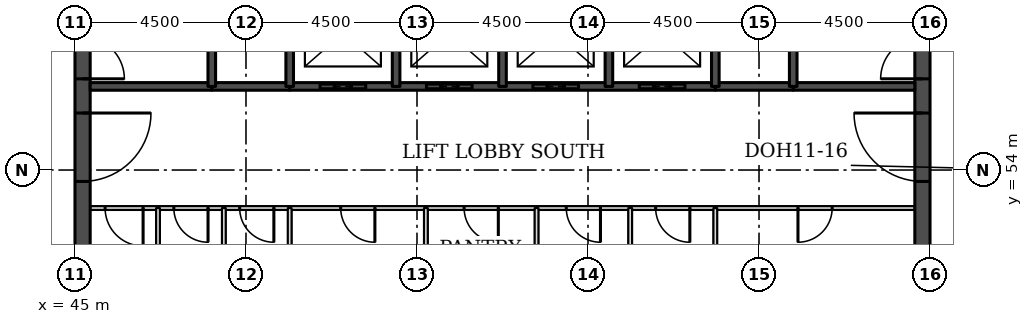
"""IFC4 building model, lengths in metres.
Left out: names, types, materials, properties, quantities, classifications, styles, units other than length and angle.
Written with IfcOpenShell. Run it as: python <this file> out.ifc"""

import sys

from ifc_helpers import new_model, si_unit, direction, frame, frame_2d, origin, place, context, subcontext, project, spatial, rectangle, extrude, element, fill, save


model = new_model("IFC4")
c1 = context("Model", 3, precision=1e-05, world=origin(), true_north=direction((0.0, 1.0)))
c2 = subcontext(c1, "Body", "Model", "MODEL_VIEW")
j1 = project(units=[si_unit("LENGTHUNIT", "METRE"), si_unit("PLANEANGLEUNIT", "RADIAN")], contexts=[c1])
p1 = place(None, origin())
s1 = spatial("IfcSite", under=j1, at=p1, CompositionType="ELEMENT")
p2 = place(p1, origin())
s2 = spatial("IfcBuilding", under=s1, at=p2, CompositionType="ELEMENT")
p3 = place(p2, frame((0.0, 0.0, 234.1)))
s3 = spatial("IfcBuildingStorey", under=s2, at=p3, CompositionType="ELEMENT", Elevation=234.1)
p4 = place(p3, frame((45.2, 49.5, 0.0), z_axis=(0.0, 0.0, 1.0), x_axis=(0.0, 1.0, 0.0)))
e1 = element("IfcWall", 1, at=p4, inside=s3, PredefinedType="SHEAR", context=c2, shape_type="SweptSolid", body=[
    extrude(rectangle(XDim=22.5, YDim=0.4, at=frame_2d((11.25, 0.0))), origin(), (0.0, 0.0, 1.0), 3.7),
])
p5 = place(p4, frame((4.2, 0.0, 0.0)))
e2 = element("IfcOpeningElement", 2, at=p5, cuts=e1, PredefinedType="OPENING", context=c2, shape_type="SweptSolid", body=[
    extrude(rectangle(XDim=1.8, YDim=2.1, at=frame_2d((0.9, 1.05))), frame((0.0, 0.21, 0.0), z_axis=(0.0, -1.0, 0.0), x_axis=(1.0, 0.0, 0.0)), (0.0, 0.0, 1.0), 0.42),
])
p6 = place(p4, frame((6.9, 0.0, 0.0)))
e3 = element("IfcOpeningElement", 3, at=p6, cuts=e1, PredefinedType="OPENING", context=c2, shape_type="SweptSolid", body=[
    extrude(rectangle(XDim=1.1, YDim=2.1, at=frame_2d((0.55, 1.05))), frame((0.0, 0.21, 0.0), z_axis=(0.0, -1.0, 0.0), x_axis=(1.0, 0.0, 0.0)), (0.0, 0.0, 1.0), 0.42),
])
p7 = place(p4, frame((13.6, 0.0, 0.0)))
e4 = element("IfcOpeningElement", 4, at=p7, cuts=e1, PredefinedType="OPENING", context=c2, shape_type="SweptSolid", body=[
    extrude(rectangle(XDim=1.1, YDim=2.1, at=frame_2d((0.55, 1.05))), frame((0.0, 0.21, 0.0), z_axis=(0.0, -1.0, 0.0), x_axis=(1.0, 0.0, 0.0)), (0.0, 0.0, 1.0), 0.42),
])
p8 = place(p4, frame((16.5, 0.0, 0.0)))
e5 = element("IfcOpeningElement", 5, at=p8, cuts=e1, PredefinedType="OPENING", context=c2, shape_type="SweptSolid", body=[
    extrude(rectangle(XDim=1.8, YDim=2.1, at=frame_2d((0.9, 1.05))), frame((0.0, 0.21, 0.0), z_axis=(0.0, -1.0, 0.0), x_axis=(1.0, 0.0, 0.0)), (0.0, 0.0, 1.0), 0.42),
])
p9 = place(p3, frame((67.3, 49.5, 0.0), z_axis=(0.0, 0.0, 1.0), x_axis=(0.0, 1.0, 0.0)))
e6 = element("IfcWall", 6, at=p9, inside=s3, PredefinedType="SHEAR", context=c2, shape_type="SweptSolid", body=[
    extrude(rectangle(XDim=22.5, YDim=0.4, at=frame_2d((11.25, 0.0))), origin(), (0.0, 0.0, 1.0), 3.7),
])
p10 = place(p9, frame((4.2, 0.0, 0.0)))
e7 = element("IfcOpeningElement", 7, at=p10, cuts=e6, PredefinedType="OPENING", context=c2, shape_type="SweptSolid", body=[
    extrude(rectangle(XDim=1.8, YDim=2.1, at=frame_2d((0.9, 1.05))), frame((0.0, 0.21, 0.0), z_axis=(0.0, -1.0, 0.0), x_axis=(1.0, 0.0, 0.0)), (0.0, 0.0, 1.0), 0.42),
])
p11 = place(p9, frame((6.9, 0.0, 0.0)))
e8 = element("IfcOpeningElement", 8, at=p11, cuts=e6, PredefinedType="OPENING", context=c2, shape_type="SweptSolid", body=[
    extrude(rectangle(XDim=1.1, YDim=2.1, at=frame_2d((0.55, 1.05))), frame((0.0, 0.21, 0.0), z_axis=(0.0, -1.0, 0.0), x_axis=(1.0, 0.0, 0.0)), (0.0, 0.0, 1.0), 0.42),
])
p12 = place(p9, frame((13.6, 0.0, 0.0)))
e9 = element("IfcOpeningElement", 9, at=p12, cuts=e6, PredefinedType="OPENING", context=c2, shape_type="SweptSolid", body=[
    extrude(rectangle(XDim=1.1, YDim=2.1, at=frame_2d((0.55, 1.05))), frame((0.0, 0.21, 0.0), z_axis=(0.0, -1.0, 0.0), x_axis=(1.0, 0.0, 0.0)), (0.0, 0.0, 1.0), 0.42),
])
p13 = place(p9, frame((16.5, 0.0, 0.0)))
e10 = element("IfcOpeningElement", 10, at=p13, cuts=e6, PredefinedType="OPENING", context=c2, shape_type="SweptSolid", body=[
    extrude(rectangle(XDim=1.8, YDim=2.1, at=frame_2d((0.9, 1.05))), frame((0.0, 0.21, 0.0), z_axis=(0.0, -1.0, 0.0), x_axis=(1.0, 0.0, 0.0)), (0.0, 0.0, 1.0), 0.42),
])
p14 = place(p3, frame((45.4, 53.0, 0.0), z_axis=(0.0, 0.0, 1.0), x_axis=(1.0, 0.0, 0.0)))
e11 = element("IfcWall", 11, at=p14, inside=s3, PredefinedType="PARTITIONING", context=c2, shape_type="SweptSolid", body=[
    extrude(rectangle(XDim=21.7, YDim=0.1, at=frame_2d((10.85, 0.0))), origin(), (0.0, 0.0, 1.0), 3.55),
])
p15 = place(p14, frame((18.625, 0.0, 0.0)))
e12 = element("IfcOpeningElement", 12, at=p15, cuts=e11, PredefinedType="OPENING", context=c2, shape_type="SweptSolid", body=[
    extrude(rectangle(XDim=0.9, YDim=2.1, at=frame_2d((0.45, 1.05))), frame((0.0, 0.06, 0.0), z_axis=(0.0, -1.0, 0.0), x_axis=(1.0, 0.0, 0.0)), (0.0, 0.0, 1.0), 0.12),
])
p16 = place(p14, frame((0.393, 0.0, 0.0)))
e13 = element("IfcOpeningElement", 13, at=p16, cuts=e11, PredefinedType="OPENING", context=c2, shape_type="SweptSolid", body=[
    extrude(rectangle(XDim=1.0, YDim=2.1, at=frame_2d((0.5, 1.05))), frame((0.0, 0.06, 0.0), z_axis=(0.0, -1.0, 0.0), x_axis=(1.0, 0.0, 0.0)), (0.0, 0.0, 1.0), 0.12),
])
p17 = place(p14, frame((2.201, 0.0, 0.0)))
e14 = element("IfcOpeningElement", 14, at=p17, cuts=e11, PredefinedType="OPENING", context=c2, shape_type="SweptSolid", body=[
    extrude(rectangle(XDim=0.9, YDim=2.1, at=frame_2d((0.45, 1.05))), frame((0.0, 0.06, 0.0), z_axis=(0.0, -1.0, 0.0), x_axis=(1.0, 0.0, 0.0)), (0.0, 0.0, 1.0), 0.12),
])
p18 = place(p14, frame((3.934, 0.0, 0.0)))
e15 = element("IfcOpeningElement", 15, at=p18, cuts=e11, PredefinedType="OPENING", context=c2, shape_type="SweptSolid", body=[
    extrude(rectangle(XDim=0.9, YDim=2.1, at=frame_2d((0.45, 1.05))), frame((0.0, 0.06, 0.0), z_axis=(0.0, -1.0, 0.0), x_axis=(1.0, 0.0, 0.0)), (0.0, 0.0, 1.0), 0.12),
])
p19 = place(p14, frame((6.592, 0.0, 0.0)))
e16 = element("IfcOpeningElement", 16, at=p19, cuts=e11, PredefinedType="OPENING", context=c2, shape_type="SweptSolid", body=[
    extrude(rectangle(XDim=0.9, YDim=2.1, at=frame_2d((0.45, 1.05))), frame((0.0, 0.06, 0.0), z_axis=(0.0, -1.0, 0.0), x_axis=(1.0, 0.0, 0.0)), (0.0, 0.0, 1.0), 0.12),
])
p20 = place(p14, frame((9.84, 0.0, 0.0)))
e17 = element("IfcOpeningElement", 17, at=p20, cuts=e11, PredefinedType="OPENING", context=c2, shape_type="SweptSolid", body=[
    extrude(rectangle(XDim=0.9, YDim=2.1, at=frame_2d((0.45, 1.05))), frame((0.0, 0.06, 0.0), z_axis=(0.0, -1.0, 0.0), x_axis=(1.0, 0.0, 0.0)), (0.0, 0.0, 1.0), 0.12),
])
p21 = place(p14, frame((12.528, 0.0, 0.0)))
e18 = element("IfcOpeningElement", 18, at=p21, cuts=e11, PredefinedType="OPENING", context=c2, shape_type="SweptSolid", body=[
    extrude(rectangle(XDim=0.9, YDim=2.1, at=frame_2d((0.45, 1.05))), frame((0.0, 0.06, 0.0), z_axis=(0.0, -1.0, 0.0), x_axis=(1.0, 0.0, 0.0)), (0.0, 0.0, 1.0), 0.12),
])
p22 = place(p14, frame((14.88, 0.0, 0.0)))
e19 = element("IfcOpeningElement", 19, at=p22, cuts=e11, PredefinedType="OPENING", context=c2, shape_type="SweptSolid", body=[
    extrude(rectangle(XDim=0.9, YDim=2.1, at=frame_2d((0.45, 1.05))), frame((0.0, 0.06, 0.0), z_axis=(0.0, -1.0, 0.0), x_axis=(1.0, 0.0, 0.0)), (0.0, 0.0, 1.0), 0.12),
])
for number, where, z_axis, x_axis in (
    (20, (48.6, 56.2, 0.0), (0.0, 0.0, 1.0), (1.0, 0.0, 0.0)),
    (21, (61.85, 56.2, 0.0), (0.0, 0.0, 1.0), (1.0, 0.0, 0.0)),
):
    element("IfcWall", number, at=place(p3, frame(where, z_axis=z_axis, x_axis=x_axis)), inside=s3, PredefinedType="SOLIDWALL", context=c2, shape_type="SweptSolid", body=[
        extrude(rectangle(XDim=2.05, YDim=0.2, at=frame_2d((1.025, 0.0))), origin(), (0.0, 0.0, 1.0), 3.55),
    ])
p23 = place(p3, frame((45.4, 56.2, 0.0), z_axis=(0.0, 0.0, 1.0), x_axis=(1.0, 0.0, 0.0)))
e22 = element("IfcWall", 22, at=p23, inside=s3, PredefinedType="SOLIDWALL", context=c2, shape_type="SweptSolid", body=[
    extrude(rectangle(XDim=3.2, YDim=0.2, at=frame_2d((1.6, 0.0))), origin(), (0.0, 0.0, 1.0), 3.55),
])
p24 = place(p3, frame((50.65, 56.2, 0.0), z_axis=(0.0, 0.0, 1.0), x_axis=(1.0, 0.0, 0.0)))
e23 = element("IfcWall", 23, at=p24, inside=s3, PredefinedType="SOLIDWALL", context=c2, shape_type="SweptSolid", body=[
    extrude(rectangle(XDim=11.2, YDim=0.2, at=frame_2d((5.6, 0.0))), origin(), (0.0, 0.0, 1.0), 3.55),
])
p25 = place(p24, frame((0.8, 0.0, 0.0)))
e24 = element("IfcOpeningElement", 24, at=p25, cuts=e23, PredefinedType="OPENING", context=c2, shape_type="SweptSolid", body=[
    extrude(rectangle(XDim=1.2, YDim=2.1, at=frame_2d((0.6, 1.05))), frame((0.0, 0.11, 0.0), z_axis=(0.0, -1.0, 0.0), x_axis=(1.0, 0.0, 0.0)), (0.0, 0.0, 1.0), 0.22),
])
p26 = place(p24, frame((3.6, 0.0, 0.0)))
e25 = element("IfcOpeningElement", 25, at=p26, cuts=e23, PredefinedType="OPENING", context=c2, shape_type="SweptSolid", body=[
    extrude(rectangle(XDim=1.2, YDim=2.1, at=frame_2d((0.6, 1.05))), frame((0.0, 0.11, 0.0), z_axis=(0.0, -1.0, 0.0), x_axis=(1.0, 0.0, 0.0)), (0.0, 0.0, 1.0), 0.22),
])
p27 = place(p24, frame((6.4, 0.0, 0.0)))
e26 = element("IfcOpeningElement", 26, at=p27, cuts=e23, PredefinedType="OPENING", context=c2, shape_type="SweptSolid", body=[
    extrude(rectangle(XDim=1.2, YDim=2.1, at=frame_2d((0.6, 1.05))), frame((0.0, 0.11, 0.0), z_axis=(0.0, -1.0, 0.0), x_axis=(1.0, 0.0, 0.0)), (0.0, 0.0, 1.0), 0.22),
])
p28 = place(p24, frame((9.2, 0.0, 0.0)))
e27 = element("IfcOpeningElement", 27, at=p28, cuts=e23, PredefinedType="OPENING", context=c2, shape_type="SweptSolid", body=[
    extrude(rectangle(XDim=1.2, YDim=2.1, at=frame_2d((0.6, 1.05))), frame((0.0, 0.11, 0.0), z_axis=(0.0, -1.0, 0.0), x_axis=(1.0, 0.0, 0.0)), (0.0, 0.0, 1.0), 0.22),
])
p29 = place(p3, frame((63.9, 56.2, 0.0), z_axis=(0.0, 0.0, 1.0), x_axis=(1.0, 0.0, 0.0)))
e28 = element("IfcWall", 28, at=p29, inside=s3, PredefinedType="SOLIDWALL", context=c2, shape_type="SweptSolid", body=[
    extrude(rectangle(XDim=3.2, YDim=0.2, at=frame_2d((1.6, 0.0))), origin(), (0.0, 0.0, 1.0), 3.55),
])
p30 = place(p3, frame((47.185, 49.9, 0.0), z_axis=(0.0, 0.0, 1.0), x_axis=(0.0, 1.0, 0.0)))
e29 = element("IfcWall", 29, at=p30, inside=s3, PredefinedType="PARTITIONING", context=c2, shape_type="SweptSolid", body=[
    extrude(rectangle(XDim=3.1, YDim=0.1, at=frame_2d((1.55, 0.0))), origin(), (0.0, 0.0, 1.0), 3.55),
])
p31 = place(p3, frame((48.6, 56.2, 0.0), z_axis=(0.0, 0.0, 1.0), x_axis=(0.0, 1.0, 0.0)))
e30 = element("IfcWall", 30, at=p31, inside=s3, PredefinedType="SOLIDWALL", context=c2, shape_type="SweptSolid", body=[
    extrude(rectangle(XDim=5.8, YDim=0.2, at=frame_2d((2.9, 0.0))), origin(), (0.0, 0.0, 1.0), 3.55),
])
for number, where, z_axis, x_axis in (
    (31, (48.917, 49.9, 0.0), (0.0, 0.0, 1.0), (0.0, 1.0, 0.0)),
    (32, (50.65, 49.9, 0.0), (0.0, 0.0, 1.0), (0.0, 1.0, 0.0)),
):
    element("IfcWall", number, at=place(p3, frame(where, z_axis=z_axis, x_axis=x_axis)), inside=s3, PredefinedType="PARTITIONING", context=c2, shape_type="SweptSolid", body=[
        extrude(rectangle(XDim=3.1, YDim=0.1, at=frame_2d((1.55, 0.0))), origin(), (0.0, 0.0, 1.0), 3.55),
    ])
for number, where, z_axis, x_axis in (
    (33, (50.65, 56.2, 0.0), (0.0, 0.0, 1.0), (0.0, 1.0, 0.0)),
    (34, (53.45, 56.2, 0.0), (0.0, 0.0, 1.0), (0.0, 1.0, 0.0)),
):
    element("IfcWall", number, at=place(p3, frame(where, z_axis=z_axis, x_axis=x_axis)), inside=s3, PredefinedType="SOLIDWALL", context=c2, shape_type="SweptSolid", body=[
        extrude(rectangle(XDim=2.8, YDim=0.2, at=frame_2d((1.4, 0.0))), origin(), (0.0, 0.0, 1.0), 3.55),
    ])
p32 = place(p3, frame((54.234, 49.9, 0.0), z_axis=(0.0, 0.0, 1.0), x_axis=(0.0, 1.0, 0.0)))
e35 = element("IfcWall", 35, at=p32, inside=s3, PredefinedType="PARTITIONING", context=c2, shape_type="SweptSolid", body=[
    extrude(rectangle(XDim=3.1, YDim=0.1, at=frame_2d((1.55, 0.0))), origin(), (0.0, 0.0, 1.0), 3.55),
])
p33 = place(p3, frame((56.25, 56.2, 0.0), z_axis=(0.0, 0.0, 1.0), x_axis=(0.0, 1.0, 0.0)))
e36 = element("IfcWall", 36, at=p33, inside=s3, PredefinedType="SOLIDWALL", context=c2, shape_type="SweptSolid", body=[
    extrude(rectangle(XDim=2.8, YDim=0.2, at=frame_2d((1.4, 0.0))), origin(), (0.0, 0.0, 1.0), 3.55),
])
p34 = place(p3, frame((57.146, 49.9, 0.0), z_axis=(0.0, 0.0, 1.0), x_axis=(0.0, 1.0, 0.0)))
e37 = element("IfcWall", 37, at=p34, inside=s3, PredefinedType="PARTITIONING", context=c2, shape_type="SweptSolid", body=[
    extrude(rectangle(XDim=3.1, YDim=0.1, at=frame_2d((1.55, 0.0))), origin(), (0.0, 0.0, 1.0), 3.55),
])
p35 = place(p3, frame((59.05, 56.2, 0.0), z_axis=(0.0, 0.0, 1.0), x_axis=(0.0, 1.0, 0.0)))
e38 = element("IfcWall", 38, at=p35, inside=s3, PredefinedType="SOLIDWALL", context=c2, shape_type="SweptSolid", body=[
    extrude(rectangle(XDim=2.8, YDim=0.2, at=frame_2d((1.4, 0.0))), origin(), (0.0, 0.0, 1.0), 3.55),
])
for number, where, z_axis, x_axis in (
    (39, (59.61, 49.9, 0.0), (0.0, 0.0, 1.0), (0.0, 1.0, 0.0)),
    (40, (61.85, 49.9, 0.0), (0.0, 0.0, 1.0), (0.0, 1.0, 0.0)),
):
    element("IfcWall", number, at=place(p3, frame(where, z_axis=z_axis, x_axis=x_axis)), inside=s3, PredefinedType="PARTITIONING", context=c2, shape_type="SweptSolid", body=[
        extrude(rectangle(XDim=3.1, YDim=0.1, at=frame_2d((1.55, 0.0))), origin(), (0.0, 0.0, 1.0), 3.55),
    ])
p36 = place(p3, frame((61.85, 56.2, 0.0), z_axis=(0.0, 0.0, 1.0), x_axis=(0.0, 1.0, 0.0)))
e41 = element("IfcWall", 41, at=p36, inside=s3, PredefinedType="SOLIDWALL", context=c2, shape_type="SweptSolid", body=[
    extrude(rectangle(XDim=2.8, YDim=0.2, at=frame_2d((1.4, 0.0))), origin(), (0.0, 0.0, 1.0), 3.55),
])
p37 = place(p3, frame((63.9, 56.2, 0.0), z_axis=(0.0, 0.0, 1.0), x_axis=(0.0, 1.0, 0.0)))
e42 = element("IfcWall", 42, at=p37, inside=s3, PredefinedType="SOLIDWALL", context=c2, shape_type="SweptSolid", body=[
    extrude(rectangle(XDim=5.8, YDim=0.2, at=frame_2d((2.9, 0.0))), origin(), (0.0, 0.0, 1.0), 3.55),
])
p38 = place(p25, origin())
e43 = element("IfcDoor", 43, at=p38, inside=s3, OperationType="DOUBLE_DOOR_SLIDING", PredefinedType="DOOR", context=c2, shape_type="SweptSolid", body=[
    extrude(rectangle(XDim=1.2, YDim=2.1, at=frame_2d((0.6, 1.05))), frame((0.0, 0.025, 0.0), z_axis=(0.0, -1.0, 0.0), x_axis=(1.0, 0.0, 0.0)), (0.0, 0.0, 1.0), 0.05),
])
fill(e24, e43)
p39 = place(p26, origin())
e44 = element("IfcDoor", 44, at=p39, inside=s3, OperationType="DOUBLE_DOOR_SLIDING", PredefinedType="DOOR", context=c2, shape_type="SweptSolid", body=[
    extrude(rectangle(XDim=1.2, YDim=2.1, at=frame_2d((0.6, 1.05))), frame((0.0, 0.025, 0.0), z_axis=(0.0, -1.0, 0.0), x_axis=(1.0, 0.0, 0.0)), (0.0, 0.0, 1.0), 0.05),
])
fill(e25, e44)
p40 = place(p27, origin())
e45 = element("IfcDoor", 45, at=p40, inside=s3, OperationType="DOUBLE_DOOR_SLIDING", PredefinedType="DOOR", context=c2, shape_type="SweptSolid", body=[
    extrude(rectangle(XDim=1.2, YDim=2.1, at=frame_2d((0.6, 1.05))), frame((0.0, 0.025, 0.0), z_axis=(0.0, -1.0, 0.0), x_axis=(1.0, 0.0, 0.0)), (0.0, 0.0, 1.0), 0.05),
])
fill(e26, e45)
p41 = place(p28, origin())
e46 = element("IfcDoor", 46, at=p41, inside=s3, OperationType="DOUBLE_DOOR_SLIDING", PredefinedType="DOOR", context=c2, shape_type="SweptSolid", body=[
    extrude(rectangle(XDim=1.2, YDim=2.1, at=frame_2d((0.6, 1.05))), frame((0.0, 0.025, 0.0), z_axis=(0.0, -1.0, 0.0), x_axis=(1.0, 0.0, 0.0)), (0.0, 0.0, 1.0), 0.05),
])
fill(e27, e46)
p42 = place(p5, frame((1.8, 0.0, 0.0), z_axis=(0.0, 0.0, 1.0), x_axis=(-1.0, 0.0, 0.0)))
e47 = element("IfcDoor", 47, at=p42, inside=s3, OperationType="SINGLE_SWING_LEFT", PredefinedType="DOOR", context=c2, shape_type="SweptSolid", body=[
    extrude(rectangle(XDim=1.8, YDim=2.1, at=frame_2d((0.9, 1.05))), frame((0.0, 0.025, 0.0), z_axis=(0.0, -1.0, 0.0), x_axis=(1.0, 0.0, 0.0)), (0.0, 0.0, 1.0), 0.05),
])
fill(e2, e47)
p43 = place(p6, frame((1.1, 0.0, 0.0), z_axis=(0.0, 0.0, 1.0), x_axis=(-1.0, 0.0, 0.0)))
e48 = element("IfcDoor", 48, at=p43, inside=s3, OperationType="SINGLE_SWING_RIGHT", PredefinedType="DOOR", context=c2, shape_type="SweptSolid", body=[
    extrude(rectangle(XDim=1.1, YDim=2.1, at=frame_2d((0.55, 1.05))), frame((0.0, 0.025, 0.0), z_axis=(0.0, -1.0, 0.0), x_axis=(1.0, 0.0, 0.0)), (0.0, 0.0, 1.0), 0.05),
])
fill(e3, e48)
p44 = place(p10, origin())
e49 = element("IfcDoor", 49, at=p44, inside=s3, OperationType="SINGLE_SWING_RIGHT", PredefinedType="DOOR", context=c2, shape_type="SweptSolid", body=[
    extrude(rectangle(XDim=1.8, YDim=2.1, at=frame_2d((0.9, 1.05))), frame((0.0, 0.025, 0.0), z_axis=(0.0, -1.0, 0.0), x_axis=(1.0, 0.0, 0.0)), (0.0, 0.0, 1.0), 0.05),
])
fill(e7, e49)
p45 = place(p11, origin())
e50 = element("IfcDoor", 50, at=p45, inside=s3, OperationType="SINGLE_SWING_LEFT", PredefinedType="DOOR", context=c2, shape_type="SweptSolid", body=[
    extrude(rectangle(XDim=1.1, YDim=2.1, at=frame_2d((0.55, 1.05))), frame((0.0, 0.025, 0.0), z_axis=(0.0, -1.0, 0.0), x_axis=(1.0, 0.0, 0.0)), (0.0, 0.0, 1.0), 0.05),
])
fill(e8, e50)
p46 = place(p15, frame((0.9, 0.0, 0.0), z_axis=(0.0, 0.0, 1.0), x_axis=(-1.0, 0.0, 0.0)))
e51 = element("IfcDoor", 51, at=p46, inside=s3, OperationType="SINGLE_SWING_RIGHT", PredefinedType="DOOR", context=c2, shape_type="SweptSolid", body=[
    extrude(rectangle(XDim=0.9, YDim=2.1, at=frame_2d((0.45, 1.05))), frame((0.0, 0.025, 0.0), z_axis=(0.0, -1.0, 0.0), x_axis=(1.0, 0.0, 0.0)), (0.0, 0.0, 1.0), 0.05),
])
fill(e12, e51)
p47 = place(p16, frame((1.0, 0.0, 0.0), z_axis=(0.0, 0.0, 1.0), x_axis=(-1.0, 0.0, 0.0)))
e52 = element("IfcDoor", 52, at=p47, inside=s3, OperationType="SINGLE_SWING_LEFT", PredefinedType="DOOR", context=c2, shape_type="SweptSolid", body=[
    extrude(rectangle(XDim=1.0, YDim=2.1, at=frame_2d((0.5, 1.05))), frame((0.0, 0.025, 0.0), z_axis=(0.0, -1.0, 0.0), x_axis=(1.0, 0.0, 0.0)), (0.0, 0.0, 1.0), 0.05),
])
fill(e13, e52)
p48 = place(p17, frame((0.9, 0.0, 0.0), z_axis=(0.0, 0.0, 1.0), x_axis=(-1.0, 0.0, 0.0)))
e53 = element("IfcDoor", 53, at=p48, inside=s3, OperationType="SINGLE_SWING_LEFT", PredefinedType="DOOR", context=c2, shape_type="SweptSolid", body=[
    extrude(rectangle(XDim=0.9, YDim=2.1, at=frame_2d((0.45, 1.05))), frame((0.0, 0.025, 0.0), z_axis=(0.0, -1.0, 0.0), x_axis=(1.0, 0.0, 0.0)), (0.0, 0.0, 1.0), 0.05),
])
fill(e14, e53)
p49 = place(p18, frame((0.9, 0.0, 0.0), z_axis=(0.0, 0.0, 1.0), x_axis=(-1.0, 0.0, 0.0)))
e54 = element("IfcDoor", 54, at=p49, inside=s3, OperationType="SINGLE_SWING_LEFT", PredefinedType="DOOR", context=c2, shape_type="SweptSolid", body=[
    extrude(rectangle(XDim=0.9, YDim=2.1, at=frame_2d((0.45, 1.05))), frame((0.0, 0.025, 0.0), z_axis=(0.0, -1.0, 0.0), x_axis=(1.0, 0.0, 0.0)), (0.0, 0.0, 1.0), 0.05),
])
fill(e15, e54)
p50 = place(p19, frame((0.9, 0.0, 0.0), z_axis=(0.0, 0.0, 1.0), x_axis=(-1.0, 0.0, 0.0)))
e55 = element("IfcDoor", 55, at=p50, inside=s3, OperationType="SINGLE_SWING_LEFT", PredefinedType="DOOR", context=c2, shape_type="SweptSolid", body=[
    extrude(rectangle(XDim=0.9, YDim=2.1, at=frame_2d((0.45, 1.05))), frame((0.0, 0.025, 0.0), z_axis=(0.0, -1.0, 0.0), x_axis=(1.0, 0.0, 0.0)), (0.0, 0.0, 1.0), 0.05),
])
fill(e16, e55)
p51 = place(p20, frame((0.9, 0.0, 0.0), z_axis=(0.0, 0.0, 1.0), x_axis=(-1.0, 0.0, 0.0)))
e56 = element("IfcDoor", 56, at=p51, inside=s3, OperationType="SINGLE_SWING_LEFT", PredefinedType="DOOR", context=c2, shape_type="SweptSolid", body=[
    extrude(rectangle(XDim=0.9, YDim=2.1, at=frame_2d((0.45, 1.05))), frame((0.0, 0.025, 0.0), z_axis=(0.0, -1.0, 0.0), x_axis=(1.0, 0.0, 0.0)), (0.0, 0.0, 1.0), 0.05),
])
fill(e17, e56)
p52 = place(p21, frame((0.9, 0.0, 0.0), z_axis=(0.0, 0.0, 1.0), x_axis=(-1.0, 0.0, 0.0)))
e57 = element("IfcDoor", 57, at=p52, inside=s3, OperationType="SINGLE_SWING_LEFT", PredefinedType="DOOR", context=c2, shape_type="SweptSolid", body=[
    extrude(rectangle(XDim=0.9, YDim=2.1, at=frame_2d((0.45, 1.05))), frame((0.0, 0.025, 0.0), z_axis=(0.0, -1.0, 0.0), x_axis=(1.0, 0.0, 0.0)), (0.0, 0.0, 1.0), 0.05),
])
fill(e18, e57)
p53 = place(p22, frame((0.9, 0.0, 0.0), z_axis=(0.0, 0.0, 1.0), x_axis=(-1.0, 0.0, 0.0)))
e58 = element("IfcDoor", 58, at=p53, inside=s3, OperationType="SINGLE_SWING_LEFT", PredefinedType="DOOR", context=c2, shape_type="SweptSolid", body=[
    extrude(rectangle(XDim=0.9, YDim=2.1, at=frame_2d((0.45, 1.05))), frame((0.0, 0.025, 0.0), z_axis=(0.0, -1.0, 0.0), x_axis=(1.0, 0.0, 0.0)), (0.0, 0.0, 1.0), 0.05),
])
fill(e19, e58)
save(model, sys.argv[1])
